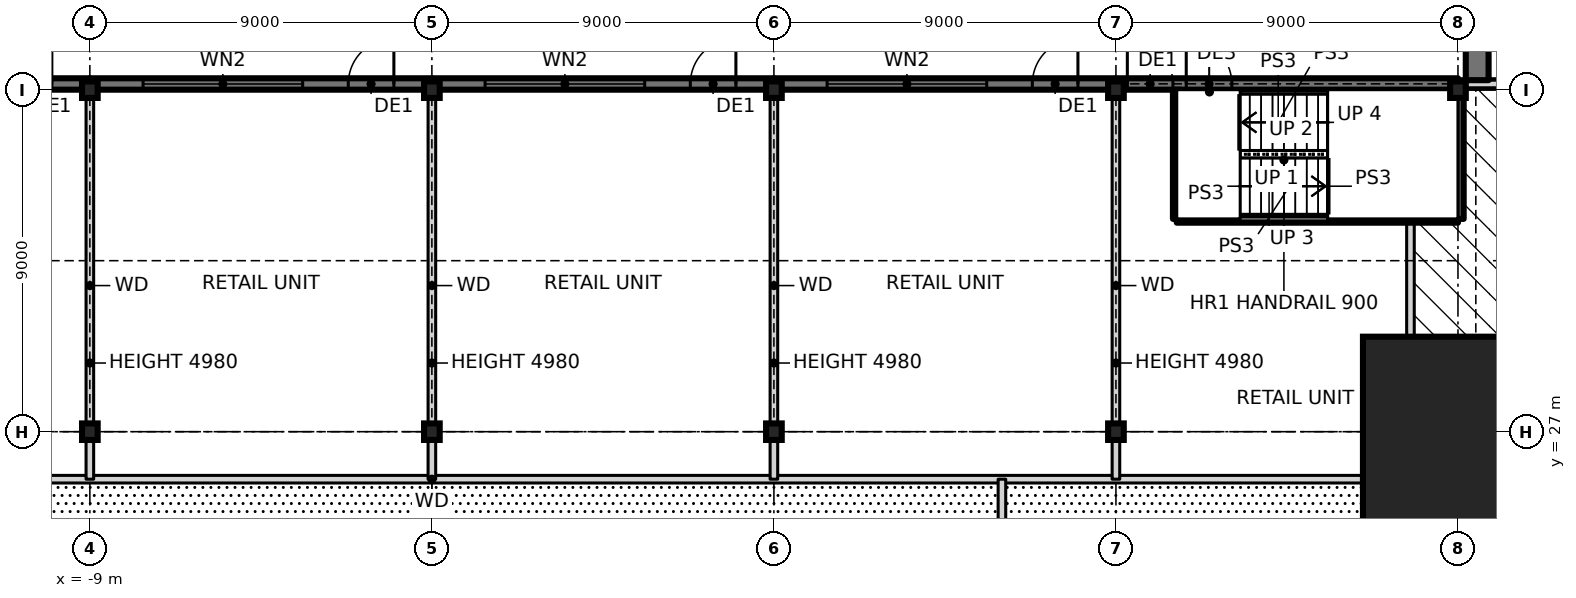
"""IFC4 building model, lengths in metres.
Left out: names, types, materials, properties, quantities, classifications, styles, units other than length and angle.
Written with IfcOpenShell. Run it as: python <this file> out.ifc"""

import sys

from ifc_helpers import new_model, si_unit, direction, frame, frame_2d, origin, origin_2d, place, context, subcontext, project, spatial, rectangle, i_section, extrude, element, fill, save


model = new_model("IFC4")
c1 = context("Model", 3, precision=1e-05, world=origin(), true_north=direction((0.0, 1.0)))
c2 = subcontext(c1, "Body", "Model", "MODEL_VIEW")
j1 = project(units=[si_unit("LENGTHUNIT", "METRE"), si_unit("PLANEANGLEUNIT", "RADIAN")], contexts=[c1])
p1 = place(None, origin())
s1 = spatial("IfcSite", under=j1, at=p1, CompositionType="ELEMENT")
p2 = place(p1, origin())
s2 = spatial("IfcBuilding", under=s1, at=p2, CompositionType="ELEMENT")
p3 = place(p2, origin())
s3 = spatial("IfcBuildingStorey", under=s2, at=p3, CompositionType="ELEMENT", Elevation=0.0)
p4 = place(p3, frame((27.0, 27.0, 0.0), z_axis=(0.0, 0.0, 1.0), x_axis=(1.0, 0.0, 0.0)))
e1 = element("IfcColumn", 1, at=p4, inside=s3, PredefinedType="COLUMN", context=c2, shape_type="SweptSolid", body=[
    extrude(rectangle(XDim=5.0, YDim=5.0, at=origin_2d()), origin(), (0.0, 0.0, 1.0), 6.0),
    extrude(i_section(OverallWidth=0.478, OverallDepth=0.599, WebThickness=0.1, FlangeThickness=0.14, at=origin_2d()), origin(), (0.0, 0.0, 1.0), 6.0),
])
for number, where, z_axis, x_axis in (
    (2, (-9.0, 27.0, 0.0), (0.0, 0.0, 1.0), (1.0, 0.0, 0.0)),
    (3, (-9.0, 36.0, 0.0), (0.0, 0.0, 1.0), (1.0, 0.0, 0.0)),
    (4, (0.0, 27.0, 0.0), (0.0, 0.0, 1.0), (1.0, 0.0, 0.0)),
    (5, (0.0, 36.0, 0.0), (0.0, 0.0, 1.0), (1.0, 0.0, 0.0)),
    (6, (9.0, 27.0, 0.0), (0.0, 0.0, 1.0), (1.0, 0.0, 0.0)),
    (7, (9.0, 36.0, 0.0), (0.0, 0.0, 1.0), (1.0, 0.0, 0.0)),
    (8, (18.0, 27.0, 0.0), (0.0, 0.0, 1.0), (1.0, 0.0, 0.0)),
    (9, (18.0, 36.0, 0.0), (0.0, 0.0, 1.0), (1.0, 0.0, 0.0)),
    (10, (27.0, 36.0, 0.0), (0.0, 0.0, 1.0), (1.0, 0.0, 0.0)),
):
    element("IfcColumn", number, at=place(p3, frame(where, z_axis=z_axis, x_axis=x_axis)), inside=s3, PredefinedType="COLUMN", context=c2, shape_type="SweptSolid", body=[
        extrude(i_section(OverallWidth=0.411, OverallDepth=0.434, WebThickness=0.036, FlangeThickness=0.057, at=origin_2d()), origin(), (0.0, 0.0, 1.0), 6.0),
    ])
p5 = place(p3, frame((-9.0, 36.15, -0.25), z_axis=(0.0, 0.0, 1.0), x_axis=(-1.0, 0.0, 0.0)))
e11 = element("IfcWall", 11, at=p5, inside=s3, PredefinedType="SOLIDWALL", context=c2, shape_type="SweptSolid", body=[
    extrude(rectangle(XDim=9.0, YDim=0.3, at=frame_2d((4.5, 0.0))), origin(), (0.0, 0.0, 1.0), 6.25),
])
p6 = place(p5, frame((1.0, 0.0, 0.25)))
e12 = element("IfcOpeningElement", 12, at=p6, cuts=e11, PredefinedType="OPENING", context=c2, shape_type="SweptSolid", body=[
    extrude(rectangle(XDim=1.2, YDim=2.4, at=frame_2d((0.6, 1.2))), frame((0.0, 0.16, 0.0), z_axis=(0.0, -1.0, 0.0), x_axis=(1.0, 0.0, 0.0)), (0.0, 0.0, 1.0), 0.32),
])
p7 = place(p5, frame((3.4, 0.0, 0.85)))
e13 = element("IfcOpeningElement", 13, at=p7, cuts=e11, PredefinedType="OPENING", context=c2, shape_type="SweptSolid", body=[
    extrude(rectangle(XDim=4.2, YDim=3.6, at=frame_2d((2.1, 1.8))), frame((0.0, 0.16, 0.0), z_axis=(0.0, -1.0, 0.0), x_axis=(1.0, 0.0, 0.0)), (0.0, 0.0, 1.0), 0.32),
])
p8 = place(p3, frame((0.0, 36.15, -0.25), z_axis=(0.0, 0.0, 1.0), x_axis=(-1.0, 0.0, 0.0)))
e14 = element("IfcWall", 14, at=p8, inside=s3, PredefinedType="SOLIDWALL", context=c2, shape_type="SweptSolid", body=[
    extrude(rectangle(XDim=9.0, YDim=0.3, at=frame_2d((4.5, 0.0))), origin(), (0.0, 0.0, 1.0), 6.25),
])
p9 = place(p8, frame((1.0, 0.0, 0.25)))
e15 = element("IfcOpeningElement", 15, at=p9, cuts=e14, PredefinedType="OPENING", context=c2, shape_type="SweptSolid", body=[
    extrude(rectangle(XDim=1.2, YDim=2.4, at=frame_2d((0.6, 1.2))), frame((0.0, 0.16, 0.0), z_axis=(0.0, -1.0, 0.0), x_axis=(1.0, 0.0, 0.0)), (0.0, 0.0, 1.0), 0.32),
])
p10 = place(p8, frame((3.4, 0.0, 0.85)))
e16 = element("IfcOpeningElement", 16, at=p10, cuts=e14, PredefinedType="OPENING", context=c2, shape_type="SweptSolid", body=[
    extrude(rectangle(XDim=4.2, YDim=3.6, at=frame_2d((2.1, 1.8))), frame((0.0, 0.16, 0.0), z_axis=(0.0, -1.0, 0.0), x_axis=(1.0, 0.0, 0.0)), (0.0, 0.0, 1.0), 0.32),
])
p11 = place(p3, frame((9.0, 36.15, -0.25), z_axis=(0.0, 0.0, 1.0), x_axis=(-1.0, 0.0, 0.0)))
e17 = element("IfcWall", 17, at=p11, inside=s3, PredefinedType="SOLIDWALL", context=c2, shape_type="SweptSolid", body=[
    extrude(rectangle(XDim=9.0, YDim=0.3, at=frame_2d((4.5, 0.0))), origin(), (0.0, 0.0, 1.0), 6.25),
])
p12 = place(p11, frame((1.0, 0.0, 0.25)))
e18 = element("IfcOpeningElement", 18, at=p12, cuts=e17, PredefinedType="OPENING", context=c2, shape_type="SweptSolid", body=[
    extrude(rectangle(XDim=1.2, YDim=2.4, at=frame_2d((0.6, 1.2))), frame((0.0, 0.16, 0.0), z_axis=(0.0, -1.0, 0.0), x_axis=(1.0, 0.0, 0.0)), (0.0, 0.0, 1.0), 0.32),
])
p13 = place(p11, frame((3.4, 0.0, 0.85)))
e19 = element("IfcOpeningElement", 19, at=p13, cuts=e17, PredefinedType="OPENING", context=c2, shape_type="SweptSolid", body=[
    extrude(rectangle(XDim=4.2, YDim=3.6, at=frame_2d((2.1, 1.8))), frame((0.0, 0.16, 0.0), z_axis=(0.0, -1.0, 0.0), x_axis=(1.0, 0.0, 0.0)), (0.0, 0.0, 1.0), 0.32),
])
p14 = place(p3, frame((18.0, 36.15, -0.25), z_axis=(0.0, 0.0, 1.0), x_axis=(-1.0, 0.0, 0.0)))
e20 = element("IfcWall", 20, at=p14, inside=s3, PredefinedType="SOLIDWALL", context=c2, shape_type="SweptSolid", body=[
    extrude(rectangle(XDim=9.0, YDim=0.3, at=frame_2d((4.5, 0.0))), origin(), (0.0, 0.0, 1.0), 6.25),
])
p15 = place(p14, frame((1.0, 0.0, 0.25)))
e21 = element("IfcOpeningElement", 21, at=p15, cuts=e20, PredefinedType="OPENING", context=c2, shape_type="SweptSolid", body=[
    extrude(rectangle(XDim=1.2, YDim=2.4, at=frame_2d((0.6, 1.2))), frame((0.0, 0.16, 0.0), z_axis=(0.0, -1.0, 0.0), x_axis=(1.0, 0.0, 0.0)), (0.0, 0.0, 1.0), 0.32),
])
p16 = place(p14, frame((3.4, 0.0, 0.85)))
e22 = element("IfcOpeningElement", 22, at=p16, cuts=e20, PredefinedType="OPENING", context=c2, shape_type="SweptSolid", body=[
    extrude(rectangle(XDim=4.2, YDim=3.6, at=frame_2d((2.1, 1.8))), frame((0.0, 0.16, 0.0), z_axis=(0.0, -1.0, 0.0), x_axis=(1.0, 0.0, 0.0)), (0.0, 0.0, 1.0), 0.32),
])
p17 = place(p3, frame((27.0, 36.15, -0.25), z_axis=(0.0, 0.0, 1.0), x_axis=(-1.0, 0.0, 0.0)))
e23 = element("IfcWall", 23, at=p17, inside=s3, PredefinedType="SOLIDWALL", context=c2, shape_type="SweptSolid", body=[
    extrude(rectangle(XDim=9.0, YDim=0.3, at=frame_2d((4.5, 0.0))), origin(), (0.0, 0.0, 1.0), 6.25),
])
p18 = place(p17, frame((7.5, 0.0, 0.25)))
e24 = element("IfcOpeningElement", 24, at=p18, cuts=e23, PredefinedType="OPENING", context=c2, shape_type="SweptSolid", body=[
    extrude(rectangle(XDim=1.2, YDim=2.4, at=frame_2d((0.6, 1.2))), frame((0.0, 0.16, 0.0), z_axis=(0.0, -1.0, 0.0), x_axis=(1.0, 0.0, 0.0)), (0.0, 0.0, 1.0), 0.32),
])
p19 = place(p17, frame((5.95, 0.0, 0.25)))
e25 = element("IfcOpeningElement", 25, at=p19, cuts=e23, PredefinedType="OPENING", context=c2, shape_type="SweptSolid", body=[
    extrude(rectangle(XDim=1.2, YDim=2.4, at=frame_2d((0.6, 1.2))), frame((0.0, 0.16, 0.0), z_axis=(0.0, -1.0, 0.0), x_axis=(1.0, 0.0, 0.0)), (0.0, 0.0, 1.0), 0.32),
])
p20 = place(p3, frame((36.0, 36.15, -0.25), z_axis=(0.0, 0.0, 1.0), x_axis=(-1.0, 0.0, 0.0)))
e26 = element("IfcWall", 26, at=p20, inside=s3, PredefinedType="SOLIDWALL", context=c2, shape_type="SweptSolid", body=[
    extrude(rectangle(XDim=9.0, YDim=0.2, at=frame_2d((4.5, 0.0))), origin(), (0.0, 0.0, 1.0), 6.25),
])
p21 = place(p20, frame((3.3, 0.0, 0.25)))
e27 = element("IfcOpeningElement", 27, at=p21, cuts=e26, PredefinedType="OPENING", context=c2, shape_type="SweptSolid", body=[
    extrude(rectangle(XDim=2.4, YDim=3.0, at=frame_2d((1.2, 1.5))), frame((0.0, 0.11, 0.0), z_axis=(0.0, -1.0, 0.0), x_axis=(1.0, 0.0, 0.0)), (0.0, 0.0, 1.0), 0.22),
])
p22 = place(p3, frame((27.506, 36.25, -0.15), z_axis=(0.0, 0.0, 1.0), x_axis=(0.0, 1.0, 0.0)))
e28 = element("IfcWall", 28, at=p22, inside=s3, PredefinedType="SOLIDWALL", context=c2, shape_type="SweptSolid", body=[
    extrude(rectangle(XDim=3.05, YDim=0.6, at=frame_2d((1.525, 0.0))), origin(), (0.0, 0.0, 1.0), 9.15),
])
p23 = place(p3, frame((-25.75, 25.75, 0.0), z_axis=(0.0, 0.0, 1.0), x_axis=(1.0, 0.0, 0.0)))
e29 = element("IfcWall", 29, at=p23, inside=s3, PredefinedType="SOLIDWALL", context=c2, shape_type="SweptSolid", body=[
    extrude(rectangle(XDim=51.5, YDim=0.2, at=frame_2d((25.75, 0.0))), origin(), (0.0, 0.0, 1.0), 5.75),
])
p24 = place(p3, frame((19.6, 32.6, 0.0), z_axis=(0.0, 0.0, 1.0), x_axis=(1.0, 0.0, 0.0)))
e30 = element("IfcWall", 30, at=p24, inside=s3, PredefinedType="SOLIDWALL", context=c2, shape_type="SweptSolid", body=[
    extrude(rectangle(XDim=7.4, YDim=0.2, at=frame_2d((3.7, 0.0))), origin(), (0.0, 0.0, 1.0), 6.0),
])
p25 = place(p3, frame((27.0, 32.6, 0.0), z_axis=(0.0, 0.0, 1.0), x_axis=(0.0, 1.0, 0.0)))
e31 = element("IfcWall", 31, at=p25, inside=s3, PredefinedType="SOLIDWALL", context=c2, shape_type="SweptSolid", body=[
    extrude(rectangle(XDim=3.183, YDim=0.3, at=frame_2d((1.591, 0.0))), origin(), (0.0, 0.0, 1.0), 6.0),
])
p26 = place(p3, frame((25.75, -32.6, 0.0), z_axis=(0.0, 0.0, 1.0), x_axis=(0.0, 1.0, 0.0)))
e32 = element("IfcWall", 32, at=p26, inside=s3, PredefinedType="SOLIDWALL", context=c2, shape_type="SweptSolid", body=[
    extrude(rectangle(XDim=65.2, YDim=0.2, at=frame_2d((32.6, 0.0))), origin(), (0.0, 0.0, 1.0), 5.75),
])
p27 = place(p26, frame((31.2, 0.0, 0.0)))
e33 = element("IfcOpeningElement", 33, at=p27, cuts=e32, PredefinedType="OPENING", context=c2, shape_type="SweptSolid", body=[
    extrude(rectangle(XDim=1.8, YDim=2.4, at=frame_2d((0.9, 1.2))), frame((0.0, 0.11, 0.0), z_axis=(0.0, -1.0, 0.0), x_axis=(1.0, 0.0, 0.0)), (0.0, 0.0, 1.0), 0.22),
])
p28 = place(p3, frame((19.6, 32.6, 0.0), z_axis=(0.0, 0.0, 1.0), x_axis=(0.0, 1.0, 0.0)))
e34 = element("IfcWall", 34, at=p28, inside=s3, PredefinedType="SOLIDWALL", context=c2, shape_type="SweptSolid", body=[
    extrude(rectangle(XDim=3.4, YDim=0.2, at=frame_2d((1.7, 0.0))), origin(), (0.0, 0.0, 1.0), 6.0),
])
p29 = place(p3, frame((18.0, 25.75, 0.0), z_axis=(0.0, 0.0, 1.0), x_axis=(0.0, 1.0, 0.0)))
e35 = element("IfcWall", 35, at=p29, inside=s3, PredefinedType="SOLIDWALL", context=c2, shape_type="SweptSolid", body=[
    extrude(rectangle(XDim=10.19, YDim=0.2, at=frame_2d((5.095, 0.0))), origin(), (0.0, 0.0, 1.0), 4.98),
])
p30 = place(p3, frame((15.0, 3.0, 0.0), z_axis=(0.0, 0.0, 1.0), x_axis=(0.0, 1.0, 0.0)))
e36 = element("IfcWall", 36, at=p30, inside=s3, PredefinedType="SOLIDWALL", context=c2, shape_type="SweptSolid", body=[
    extrude(rectangle(XDim=22.75, YDim=0.2, at=frame_2d((11.375, 0.0))), origin(), (0.0, 0.0, 1.0), 5.75),
])
p31 = place(p30, frame((5.1, 0.0, 0.0)))
e37 = element("IfcOpeningElement", 37, at=p31, cuts=e36, PredefinedType="OPENING", context=c2, shape_type="SweptSolid", body=[
    extrude(rectangle(XDim=1.8, YDim=2.1, at=frame_2d((0.9, 1.05))), frame((0.0, 0.11, 0.0), z_axis=(0.0, -1.0, 0.0), x_axis=(1.0, 0.0, 0.0)), (0.0, 0.0, 1.0), 0.22),
])
for number, where, z_axis, x_axis in (
    (38, (9.0, 25.75, 0.0), (0.0, 0.0, 1.0), (0.0, 1.0, 0.0)),
    (39, (0.0, 25.75, 0.0), (0.0, 0.0, 1.0), (0.0, 1.0, 0.0)),
    (40, (-9.0, 25.75, 0.0), (0.0, 0.0, 1.0), (0.0, 1.0, 0.0)),
):
    element("IfcWall", number, at=place(p3, frame(where, z_axis=z_axis, x_axis=x_axis)), inside=s3, PredefinedType="SOLIDWALL", context=c2, shape_type="SweptSolid", body=[
        extrude(rectangle(XDim=10.19, YDim=0.2, at=frame_2d((5.095, 0.0))), origin(), (0.0, 0.0, 1.0), 4.98),
    ])
p32 = place(p6, frame((1.2, 0.0, 0.0), z_axis=(0.0, 0.0, 1.0), x_axis=(-1.0, 0.0, 0.0)))
e41 = element("IfcDoor", 41, at=p32, inside=s3, OperationType="SINGLE_SWING_RIGHT", PredefinedType="DOOR", context=c2, shape_type="SweptSolid", body=[
    extrude(rectangle(XDim=1.2, YDim=2.4, at=frame_2d((0.6, 1.2))), frame((0.0, 0.025, 0.0), z_axis=(0.0, -1.0, 0.0), x_axis=(1.0, 0.0, 0.0)), (0.0, 0.0, 1.0), 0.05),
])
fill(e12, e41)
p33 = place(p9, frame((1.2, 0.0, 0.0), z_axis=(0.0, 0.0, 1.0), x_axis=(-1.0, 0.0, 0.0)))
e42 = element("IfcDoor", 42, at=p33, inside=s3, OperationType="SINGLE_SWING_RIGHT", PredefinedType="DOOR", context=c2, shape_type="SweptSolid", body=[
    extrude(rectangle(XDim=1.2, YDim=2.4, at=frame_2d((0.6, 1.2))), frame((0.0, 0.025, 0.0), z_axis=(0.0, -1.0, 0.0), x_axis=(1.0, 0.0, 0.0)), (0.0, 0.0, 1.0), 0.05),
])
fill(e15, e42)
p34 = place(p10, origin())
e43 = element("IfcWindow", 43, at=p34, inside=s3, PartitioningType="SINGLE_PANEL", PredefinedType="WINDOW", context=c2, shape_type="SweptSolid", body=[
    extrude(rectangle(XDim=4.2, YDim=3.6, at=frame_2d((2.1, 1.8))), frame((0.0, 0.03, 0.0), z_axis=(0.0, -1.0, 0.0), x_axis=(1.0, 0.0, 0.0)), (0.0, 0.0, 1.0), 0.06),
])
fill(e16, e43)
p35 = place(p12, frame((1.2, 0.0, 0.0), z_axis=(0.0, 0.0, 1.0), x_axis=(-1.0, 0.0, 0.0)))
e44 = element("IfcDoor", 44, at=p35, inside=s3, OperationType="SINGLE_SWING_RIGHT", PredefinedType="DOOR", context=c2, shape_type="SweptSolid", body=[
    extrude(rectangle(XDim=1.2, YDim=2.4, at=frame_2d((0.6, 1.2))), frame((0.0, 0.025, 0.0), z_axis=(0.0, -1.0, 0.0), x_axis=(1.0, 0.0, 0.0)), (0.0, 0.0, 1.0), 0.05),
])
fill(e18, e44)
p36 = place(p13, origin())
e45 = element("IfcWindow", 45, at=p36, inside=s3, PartitioningType="SINGLE_PANEL", PredefinedType="WINDOW", context=c2, shape_type="SweptSolid", body=[
    extrude(rectangle(XDim=4.2, YDim=3.6, at=frame_2d((2.1, 1.8))), frame((0.0, 0.03, 0.0), z_axis=(0.0, -1.0, 0.0), x_axis=(1.0, 0.0, 0.0)), (0.0, 0.0, 1.0), 0.06),
])
fill(e19, e45)
p37 = place(p15, frame((1.2, 0.0, 0.0), z_axis=(0.0, 0.0, 1.0), x_axis=(-1.0, 0.0, 0.0)))
e46 = element("IfcDoor", 46, at=p37, inside=s3, OperationType="SINGLE_SWING_RIGHT", PredefinedType="DOOR", context=c2, shape_type="SweptSolid", body=[
    extrude(rectangle(XDim=1.2, YDim=2.4, at=frame_2d((0.6, 1.2))), frame((0.0, 0.025, 0.0), z_axis=(0.0, -1.0, 0.0), x_axis=(1.0, 0.0, 0.0)), (0.0, 0.0, 1.0), 0.05),
])
fill(e21, e46)
p38 = place(p16, origin())
e47 = element("IfcWindow", 47, at=p38, inside=s3, PartitioningType="SINGLE_PANEL", PredefinedType="WINDOW", context=c2, shape_type="SweptSolid", body=[
    extrude(rectangle(XDim=4.2, YDim=3.6, at=frame_2d((2.1, 1.8))), frame((0.0, 0.03, 0.0), z_axis=(0.0, -1.0, 0.0), x_axis=(1.0, 0.0, 0.0)), (0.0, 0.0, 1.0), 0.06),
])
fill(e22, e47)
p39 = place(p18, frame((1.2, 0.0, 0.0), z_axis=(0.0, 0.0, 1.0), x_axis=(-1.0, 0.0, 0.0)))
e48 = element("IfcDoor", 48, at=p39, inside=s3, OperationType="SINGLE_SWING_LEFT", PredefinedType="DOOR", context=c2, shape_type="SweptSolid", body=[
    extrude(rectangle(XDim=1.2, YDim=2.4, at=frame_2d((0.6, 1.2))), frame((0.0, 0.025, 0.0), z_axis=(0.0, -1.0, 0.0), x_axis=(1.0, 0.0, 0.0)), (0.0, 0.0, 1.0), 0.05),
])
fill(e24, e48)
p40 = place(p19, frame((1.2, 0.0, 0.0), z_axis=(0.0, 0.0, 1.0), x_axis=(-1.0, 0.0, 0.0)))
e49 = element("IfcDoor", 49, at=p40, inside=s3, OperationType="SINGLE_SWING_LEFT", PredefinedType="DOOR", context=c2, shape_type="SweptSolid", body=[
    extrude(rectangle(XDim=1.2, YDim=2.4, at=frame_2d((0.6, 1.2))), frame((0.0, 0.025, 0.0), z_axis=(0.0, -1.0, 0.0), x_axis=(1.0, 0.0, 0.0)), (0.0, 0.0, 1.0), 0.05),
])
fill(e25, e49)
save(model, sys.argv[1])
